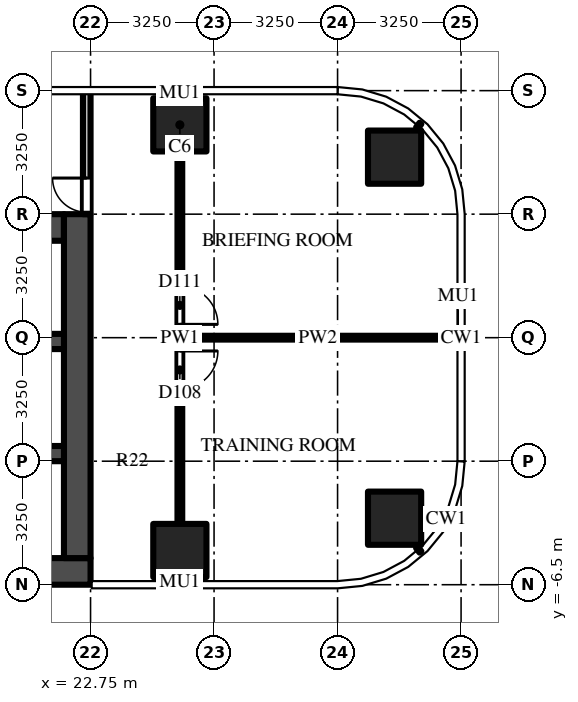
"""IFC4 building model, lengths in metres.
Left out: names, types, materials, properties, quantities, classifications, styles, units other than length and angle.
Written with IfcOpenShell. Run it as: python <this file> out.ifc"""

import sys

from ifc_helpers import new_model, si_unit, direction, frame, frame_2d, origin, origin_2d, place, context, subcontext, project, spatial, rectangle, extrude, source, transform, mapped, element, fill, save


model = new_model("IFC4")
c1 = context("Model", 3, precision=1e-05, world=origin(), true_north=direction((0.0, 1.0)))
c2 = subcontext(c1, "Body", "Model", "MODEL_VIEW")
j1 = project(units=[si_unit("LENGTHUNIT", "METRE"), si_unit("PLANEANGLEUNIT", "RADIAN")], contexts=[c1])
p1 = place(None, origin())
s1 = spatial("IfcSite", under=j1, at=p1, CompositionType="ELEMENT")
p2 = place(p1, origin())
s2 = spatial("IfcBuilding", under=s1, at=p2, CompositionType="ELEMENT")
p3 = place(p2, frame((0.0, 0.0, 47.5)))
s3 = spatial("IfcBuildingStorey", under=s2, at=p3, CompositionType="ELEMENT", Elevation=47.5)
m1 = source(origin(), c2, "Body", "SweptSolid", [
    extrude(rectangle(XDim=1.4, YDim=1.4, at=origin_2d()), origin(), (0.0, 0.0, 1.0), 4.5),
])
for number, where, z_axis, x_axis in (
    (1, (25.1, 5.6, 0.0), (0.0, 0.0, 1.0), (1.0, 0.0, 0.0)),
    (2, (30.75, 4.75, 0.0), (0.0, 0.0, 1.0), (1.0, 0.0, 0.0)),
    (3, (25.1, -5.6, 0.0), (0.0, 0.0, 1.0), (1.0, 0.0, 0.0)),
    (4, (30.75, -4.75, 0.0), (0.0, 0.0, 1.0), (1.0, 0.0, 0.0)),
):
    element("IfcColumn", number, at=place(p3, frame(where, z_axis=z_axis, x_axis=x_axis)), inside=s3, PredefinedType="COLUMN", context=c2, shape_type="MappedRepresentation", body=[
        mapped(m1, transform((0.0, 0.0, 0.0))),
    ])
m2 = source(origin(), c2, "Body", "SweptSolid", [
    extrude(rectangle(XDim=16.45, YDim=0.7, at=frame_2d((8.225, 0.0))), origin(), (0.0, 0.0, 1.0), 4.25),
])
p4 = place(p3, frame((6.3, -6.15, 0.0), z_axis=(0.0, 0.0, 1.0), x_axis=(1.0, 0.0, 0.0)))
e5 = element("IfcWall", 5, at=p4, inside=s3, PredefinedType="SHEAR", context=c2, shape_type="MappedRepresentation", body=[
    mapped(m2, transform((0.0, 0.0, 0.0))),
])
m3 = source(origin(), c2, "Body", "SweptSolid", [
    extrude(rectangle(XDim=14.85, YDim=0.7, at=frame_2d((7.425, 0.0))), origin(), (0.0, 0.0, 1.0), 4.25),
])
p5 = place(p3, frame((7.2, 2.9, 0.0), z_axis=(0.0, 0.0, 1.0), x_axis=(1.0, 0.0, 0.0)))
e6 = element("IfcWall", 6, at=p5, inside=s3, PredefinedType="SHEAR", context=c2, shape_type="MappedRepresentation", body=[
    mapped(m3, transform((0.0, 0.0, 0.0))),
])
m4 = source(origin(), c2, "Body", "SweptSolid", [
    extrude(rectangle(XDim=1.3, YDim=2.1, at=frame_2d((0.65, 1.05))), frame((0.0, 0.36, 0.0), z_axis=(0.0, -1.0, 0.0), x_axis=(1.0, 0.0, 0.0)), (0.0, 0.0, 1.0), 0.72),
])
p6 = place(p5, frame((12.2, 0.0, 0.0)))
e7 = element("IfcOpeningElement", 7, at=p6, cuts=e6, PredefinedType="OPENING", context=c2, shape_type="MappedRepresentation", body=[
    mapped(m4, transform((0.0, 0.0, 0.0))),
])
m5 = source(origin(), c2, "Body", "SweptSolid", [
    extrude(rectangle(XDim=1.2, YDim=2.1, at=frame_2d((0.6, 1.05))), frame((0.0, 0.36, 0.0), z_axis=(0.0, -1.0, 0.0), x_axis=(1.0, 0.0, 0.0)), (0.0, 0.0, 1.0), 0.72),
])
p7 = place(p5, frame((9.85, 0.0, 0.0)))
e8 = element("IfcOpeningElement", 8, at=p7, cuts=e6, PredefinedType="OPENING", context=c2, shape_type="MappedRepresentation", body=[
    mapped(m5, transform((0.0, 0.0, 0.0))),
])
m6 = source(origin(), c2, "Body", "SweptSolid", [
    extrude(rectangle(XDim=1.0, YDim=2.1, at=frame_2d((0.5, 1.05))), frame((0.0, 0.36, 0.0), z_axis=(0.0, -1.0, 0.0), x_axis=(1.0, 0.0, 0.0)), (0.0, 0.0, 1.0), 0.72),
])
p8 = place(p5, frame((7.9, 0.0, 0.0)))
e9 = element("IfcOpeningElement", 9, at=p8, cuts=e6, PredefinedType="OPENING", context=c2, shape_type="MappedRepresentation", body=[
    mapped(m6, transform((0.0, 0.0, 0.0))),
])
m7 = source(origin(), c2, "Body", "SweptSolid", [
    extrude(rectangle(XDim=0.8, YDim=2.1, at=frame_2d((0.4, 1.05))), frame((0.0, 0.36, 0.0), z_axis=(0.0, -1.0, 0.0), x_axis=(1.0, 0.0, 0.0)), (0.0, 0.0, 1.0), 0.72),
])
p9 = place(p5, frame((0.113, 0.0, 0.0)))
e10 = element("IfcOpeningElement", 10, at=p9, cuts=e6, PredefinedType="OPENING", context=c2, shape_type="MappedRepresentation", body=[
    mapped(m7, transform((0.0, 0.0, 0.0))),
])
p10 = place(p5, frame((1.288, 0.0, 0.0)))
e11 = element("IfcOpeningElement", 11, at=p10, cuts=e6, PredefinedType="OPENING", context=c2, shape_type="MappedRepresentation", body=[
    mapped(m7, transform((0.0, 0.0, 0.0))),
])
p11 = place(p5, frame((2.712, 0.0, 0.0)))
e12 = element("IfcOpeningElement", 12, at=p11, cuts=e6, PredefinedType="OPENING", context=c2, shape_type="MappedRepresentation", body=[
    mapped(m7, transform((0.0, 0.0, 0.0))),
])
p12 = place(p5, frame((3.887, 0.0, 0.0)))
e13 = element("IfcOpeningElement", 13, at=p12, cuts=e6, PredefinedType="OPENING", context=c2, shape_type="MappedRepresentation", body=[
    mapped(m7, transform((0.0, 0.0, 0.0))),
])
p13 = place(p5, frame((5.312, 0.0, 0.0)))
e14 = element("IfcOpeningElement", 14, at=p13, cuts=e6, PredefinedType="OPENING", context=c2, shape_type="MappedRepresentation", body=[
    mapped(m7, transform((0.0, 0.0, 0.0))),
])
p14 = place(p5, frame((6.488, 0.0, 0.0)))
e15 = element("IfcOpeningElement", 15, at=p14, cuts=e6, PredefinedType="OPENING", context=c2, shape_type="MappedRepresentation", body=[
    mapped(m7, transform((0.0, 0.0, 0.0))),
])
m8 = source(origin(), c2, "Body", "SweptSolid", [
    extrude(rectangle(XDim=9.05, YDim=0.7, at=frame_2d((4.525, 0.0))), origin(), (0.0, 0.0, 1.0), 4.25),
])
p15 = place(p3, frame((22.4, -5.8, 0.0), z_axis=(0.0, 0.0, 1.0), x_axis=(0.0, 1.0, 0.0)))
e16 = element("IfcWall", 16, at=p15, inside=s3, PredefinedType="SHEAR", context=c2, shape_type="MappedRepresentation", body=[
    mapped(m8, transform((0.0, 0.0, 0.0))),
])
m9 = source(origin(), c2, "Body", "SweptSolid", [
    extrude(rectangle(XDim=14.85, YDim=0.4, at=frame_2d((7.425, 0.0))), origin(), (0.0, 0.0, 1.0), 4.25),
])
p16 = place(p3, frame((7.2, -0.1, 0.0), z_axis=(0.0, 0.0, 1.0), x_axis=(1.0, 0.0, 0.0)))
e17 = element("IfcWall", 17, at=p16, inside=s3, PredefinedType="SHEAR", context=c2, shape_type="MappedRepresentation", body=[
    mapped(m9, transform((0.0, 0.0, 0.0))),
])
m10 = source(origin(), c2, "Body", "SweptSolid", [
    extrude(rectangle(XDim=1.0, YDim=2.1, at=frame_2d((0.5, 1.05))), frame((0.0, 0.21, 0.0), z_axis=(0.0, -1.0, 0.0), x_axis=(1.0, 0.0, 0.0)), (0.0, 0.0, 1.0), 0.42),
])
p17 = place(p16, frame((7.9, 0.0, 0.0)))
e18 = element("IfcOpeningElement", 18, at=p17, cuts=e17, PredefinedType="OPENING", context=c2, shape_type="MappedRepresentation", body=[
    mapped(m10, transform((0.0, 0.0, 0.0))),
])
m11 = source(origin(), c2, "Body", "SweptSolid", [
    extrude(rectangle(XDim=5.7, YDim=0.4, at=frame_2d((2.85, 0.0))), origin(), (0.0, 0.0, 1.0), 4.25),
])
p18 = place(p3, frame((16.35, -3.05, 0.0), z_axis=(0.0, 0.0, 1.0), x_axis=(1.0, 0.0, 0.0)))
e19 = element("IfcWall", 19, at=p18, inside=s3, PredefinedType="SHEAR", context=c2, shape_type="MappedRepresentation", body=[
    mapped(m11, transform((0.0, 0.0, 0.0))),
])
m12 = source(origin(), c2, "Body", "SweptSolid", [
    extrude(rectangle(XDim=3.25, YDim=0.2, at=frame_2d((1.625, 0.0))), origin(), (0.0, 0.0, 1.0), 4.25),
])
p19 = place(p3, frame((22.65, 3.25, 0.0), z_axis=(0.0, 0.0, 1.0), x_axis=(0.0, 1.0, 0.0)))
e20 = element("IfcWall", 20, at=p19, inside=s3, PredefinedType="PARTITIONING", context=c2, shape_type="MappedRepresentation", body=[
    mapped(m12, transform((0.0, 0.0, 0.0))),
])
m13 = source(origin(), c2, "Body", "SweptSolid", [
    extrude(rectangle(XDim=0.9, YDim=2.1, at=frame_2d((0.45, 1.05))), frame((0.0, 0.11, 0.0), z_axis=(0.0, -1.0, 0.0), x_axis=(1.0, 0.0, 0.0)), (0.0, 0.0, 1.0), 0.22),
])
p20 = place(p19, frame((0.05, 0.0, 0.0)))
e21 = element("IfcOpeningElement", 21, at=p20, cuts=e20, PredefinedType="OPENING", context=c2, shape_type="MappedRepresentation", body=[
    mapped(m13, transform((0.0, 0.0, 0.0))),
])
m14 = source(origin(), c2, "Body", "SweptSolid", [
    extrude(rectangle(XDim=9.8, YDim=0.125, at=frame_2d((4.9, 0.0))), origin(), (0.0, 0.0, 1.0), 3.468),
])
p21 = place(p3, frame((25.1, 4.9, 0.0), z_axis=(0.0, 0.0, 1.0), x_axis=(0.0, -1.0, 0.0)))
e22 = element("IfcWall", 22, at=p21, inside=s3, PredefinedType="PARTITIONING", context=c2, shape_type="MappedRepresentation", body=[
    mapped(m14, transform((0.0, 0.0, 0.0))),
])
m15 = source(origin(), c2, "Body", "SweptSolid", [
    extrude(rectangle(XDim=1.0, YDim=2.1, at=frame_2d((0.5, 1.05))), frame((0.0, 0.073, 0.0), z_axis=(0.0, -1.0, 0.0), x_axis=(1.0, 0.0, 0.0)), (0.0, 0.0, 1.0), 0.145),
])
p22 = place(p21, frame((5.25, 0.0, 0.0)))
e23 = element("IfcOpeningElement", 23, at=p22, cuts=e22, PredefinedType="OPENING", context=c2, shape_type="MappedRepresentation", body=[
    mapped(m15, transform((0.0, 0.0, 0.0))),
])
p23 = place(p21, frame((3.55, 0.0, 0.0)))
e24 = element("IfcOpeningElement", 24, at=p23, cuts=e22, PredefinedType="OPENING", context=c2, shape_type="MappedRepresentation", body=[
    mapped(m15, transform((0.0, 0.0, 0.0))),
])
m16 = source(origin(), c2, "Body", "SweptSolid", [
    extrude(rectangle(XDim=7.137, YDim=0.1, at=frame_2d((3.569, 0.0))), origin(), (0.0, 0.0, 1.0), 3.33),
])
p24 = place(p3, frame((25.163, 0.0, 0.0), z_axis=(0.0, 0.0, 1.0), x_axis=(1.0, 0.0, 0.0)))
e25 = element("IfcWall", 25, at=p24, inside=s3, PredefinedType="PARTITIONING", context=c2, shape_type="MappedRepresentation", body=[
    mapped(m16, transform((0.0, 0.0, 0.0))),
])
m17 = source(origin(), c2, "Body", "SweptSolid", [
    extrude(rectangle(XDim=0.9, YDim=2.1, at=frame_2d((0.45, 1.05))), frame((0.0, 0.025, 0.0), z_axis=(0.0, -1.0, 0.0), x_axis=(1.0, 0.0, 0.0)), (0.0, 0.0, 1.0), 0.05),
])
p25 = place(p20, origin())
e26 = element("IfcDoor", 26, at=p25, inside=s3, OperationType="SINGLE_SWING_RIGHT", PredefinedType="DOOR", context=c2, shape_type="MappedRepresentation", body=[
    mapped(m17, transform((0.0, 0.0, 0.0))),
])
fill(e21, e26)
m18 = source(origin(), c2, "Body", "SweptSolid", [
    extrude(rectangle(XDim=1.0, YDim=2.1, at=frame_2d((0.5, 1.05))), frame((0.0, 0.025, 0.0), z_axis=(0.0, -1.0, 0.0), x_axis=(1.0, 0.0, 0.0)), (0.0, 0.0, 1.0), 0.05),
])
p26 = place(p22, origin())
e27 = element("IfcDoor", 27, at=p26, inside=s3, OperationType="SINGLE_SWING_LEFT", PredefinedType="DOOR", context=c2, shape_type="MappedRepresentation", body=[
    mapped(m18, transform((0.0, 0.0, 0.0))),
])
fill(e23, e27)
p27 = place(p23, origin())
e28 = element("IfcDoor", 28, at=p27, inside=s3, OperationType="SINGLE_SWING_RIGHT", PredefinedType="DOOR", context=c2, shape_type="MappedRepresentation", body=[
    mapped(m18, transform((0.0, 0.0, 0.0))),
])
fill(e24, e28)
save(model, sys.argv[1])
